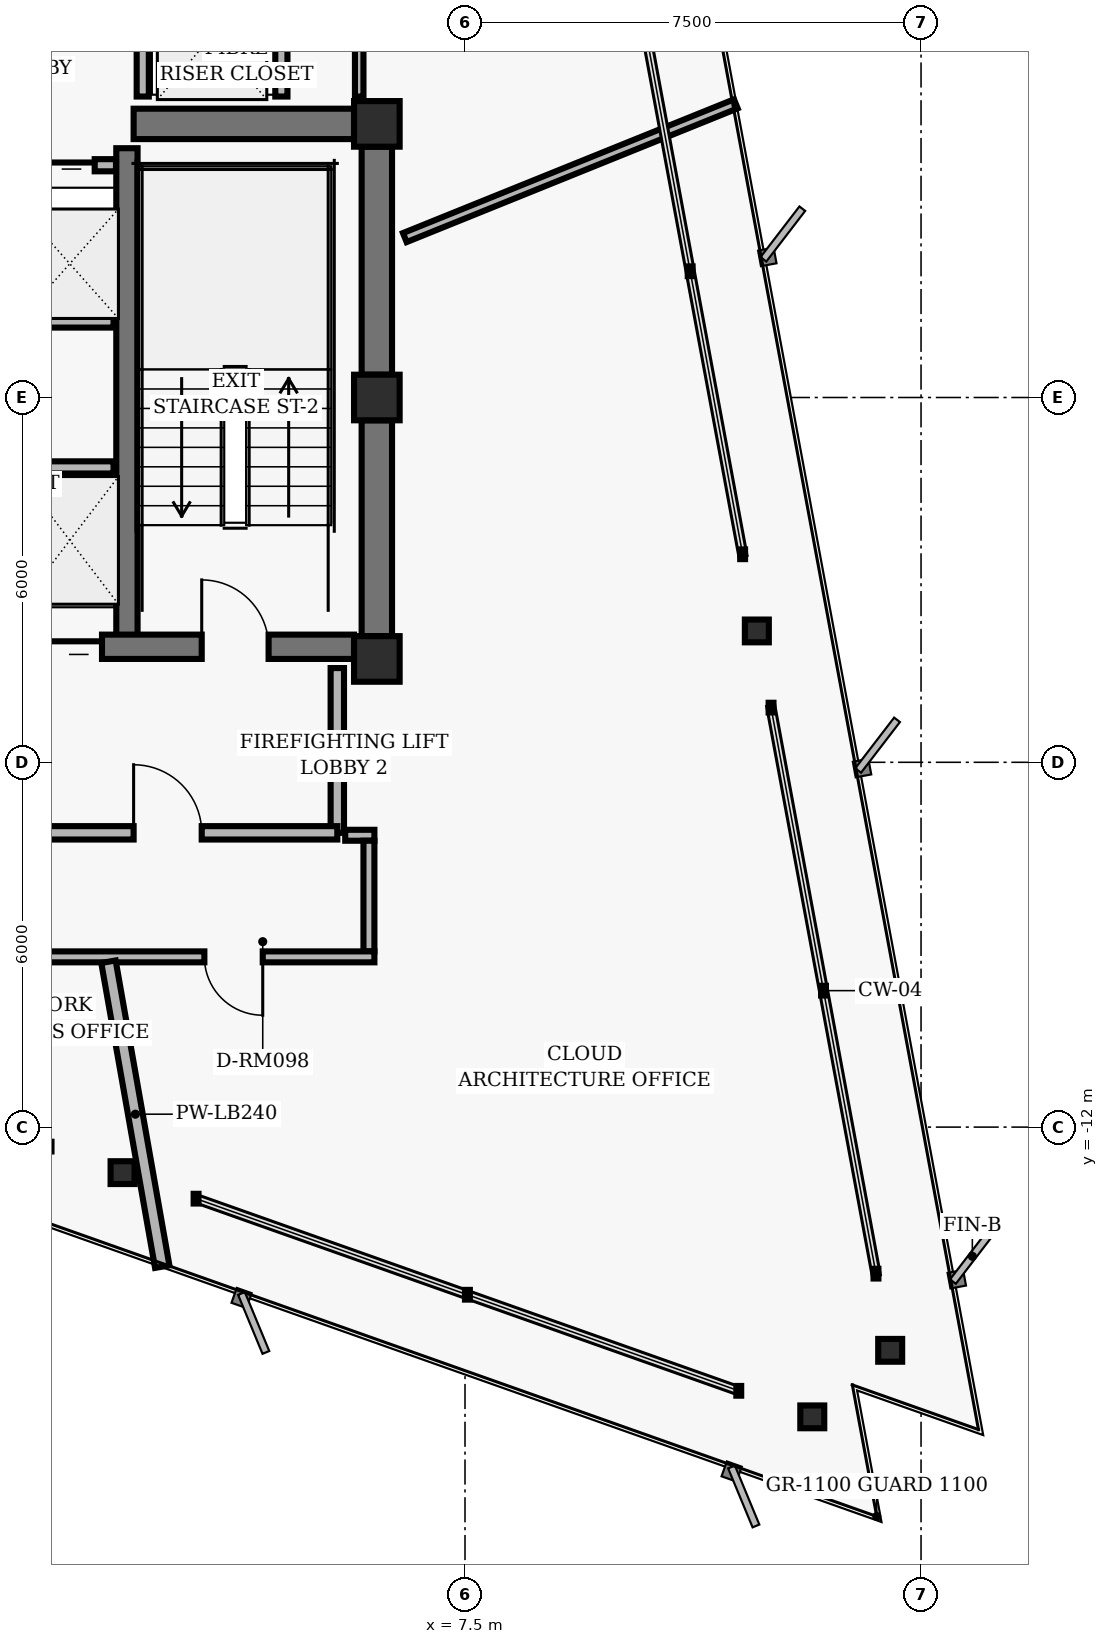
"""IFC4 building model, lengths in metres.
Left out: names, types, materials, properties, quantities, classifications, styles, units other than length and angle.
Written with IfcOpenShell. Run it as: python <this file> out.ifc"""

import sys

from ifc_helpers import new_model, si_unit, direction, frame, frame_2d, origin, origin_2d, place, context, subcontext, project, spatial, rectangle, hollow_rectangle, i_section, extrude, element, fill, save


model = new_model("IFC4")
c1 = context("Model", 3, precision=1e-05, world=origin(), true_north=direction((0.0, 1.0)))
c2 = subcontext(c1, "Body", "Model", "MODEL_VIEW")
j1 = project(units=[si_unit("LENGTHUNIT", "METRE"), si_unit("PLANEANGLEUNIT", "RADIAN")], contexts=[c1])
p1 = place(None, origin())
s1 = spatial("IfcSite", under=j1, at=p1, CompositionType="ELEMENT")
p2 = place(p1, origin())
s2 = spatial("IfcBuilding", under=s1, at=p2, CompositionType="ELEMENT")
p3 = place(p2, frame((0.0, 0.0, 190.56)))
s3 = spatial("IfcBuildingStorey", under=s2, at=p3, CompositionType="ELEMENT", Elevation=190.56)
for number, where, z_axis, x_axis in (
    (1, (6.05, 4.5, 0.0), (0.0, 0.0, 1.0), (1.0, 0.0, 0.0)),
    (2, (6.05, 0.0, 0.0), (0.0, 0.0, 1.0), (1.0, 0.0, 0.0)),
    (3, (6.05, -4.3, 0.0), (0.0, 0.0, 1.0), (1.0, 0.0, 0.0)),
):
    element("IfcColumn", number, at=place(p3, frame(where, z_axis=z_axis, x_axis=x_axis)), inside=s3, PredefinedType="COLUMN", context=c2, shape_type="SweptSolid", body=[
        extrude(hollow_rectangle(XDim=0.75, YDim=0.75, WallThickness=0.05, InnerFilletRadius=0.02, OuterFilletRadius=0.04, at=origin_2d()), origin(), (0.0, 0.0, 1.0), 3.04),
    ])
p4 = place(p3, frame((6.05, 0.375, 0.0), z_axis=(0.0, 0.0, 1.0), x_axis=(0.0, 1.0, 0.0)))
e4 = element("IfcWall", 4, at=p4, inside=s3, PredefinedType="SHEAR", context=c2, shape_type="SweptSolid", body=[
    extrude(rectangle(XDim=3.75, YDim=0.5, at=frame_2d((1.875, 0.0))), origin(), (0.0, 0.0, 1.0), 2.618),
])
p5 = place(p3, frame((6.05, -3.925, 0.0), z_axis=(0.0, 0.0, 1.0), x_axis=(0.0, 1.0, 0.0)))
e5 = element("IfcWall", 5, at=p5, inside=s3, PredefinedType="SHEAR", context=c2, shape_type="SweptSolid", body=[
    extrude(rectangle(XDim=3.55, YDim=0.5, at=frame_2d((1.775, 0.0))), origin(), (0.0, 0.0, 1.0), 2.618),
])
p6 = place(p3, frame((1.94, -4.1, 0.0), z_axis=(0.0, 0.0, 1.0), x_axis=(0.0, 1.0, 0.0)))
e6 = element("IfcWall", 6, at=p6, inside=s3, PredefinedType="SHEAR", context=c2, shape_type="SweptSolid", body=[
    extrude(rectangle(XDim=8.2, YDim=0.35, at=frame_2d((4.1, 0.0))), origin(), (0.0, 0.0, 1.0), 2.618),
])
p7 = place(p3, frame((-5.675, -4.1, 0.0), z_axis=(0.0, 0.0, 1.0), x_axis=(1.0, 0.0, 0.0)))
e7 = element("IfcWall", 7, at=p7, inside=s3, PredefinedType="SHEAR", context=c2, shape_type="SweptSolid", body=[
    extrude(rectangle(XDim=11.35, YDim=0.4, at=frame_2d((5.675, 0.0))), origin(), (0.0, 0.0, 1.0), 2.618),
])
p8 = place(p7, frame((1.405, 0.0, 0.0)))
e8 = element("IfcOpeningElement", 8, at=p8, cuts=e7, PredefinedType="OPENING", context=c2, shape_type="SweptSolid", body=[
    extrude(rectangle(XDim=1.1, YDim=2.04, at=frame_2d((0.55, 1.02))), frame((0.0, 0.21, 0.0), z_axis=(0.0, -1.0, 0.0), x_axis=(1.0, 0.0, 0.0)), (0.0, 0.0, 1.0), 0.42),
])
p9 = place(p7, frame((8.845, 0.0, 0.0)))
e9 = element("IfcOpeningElement", 9, at=p9, cuts=e7, PredefinedType="OPENING", context=c2, shape_type="SweptSolid", body=[
    extrude(rectangle(XDim=1.1, YDim=2.04, at=frame_2d((0.55, 1.02))), frame((0.0, 0.21, 0.0), z_axis=(0.0, -1.0, 0.0), x_axis=(1.0, 0.0, 0.0)), (0.0, 0.0, 1.0), 0.42),
])
p10 = place(p7, frame((4.145, 0.0, 0.0)))
e10 = element("IfcOpeningElement", 10, at=p10, cuts=e7, PredefinedType="OPENING", context=c2, shape_type="SweptSolid", body=[
    extrude(rectangle(XDim=1.06, YDim=2.04, at=frame_2d((0.53, 1.02))), frame((0.0, 0.21, 0.0), z_axis=(0.0, -1.0, 0.0), x_axis=(1.0, 0.0, 0.0)), (0.0, 0.0, 1.0), 0.42),
])
p11 = place(p7, frame((6.145, 0.0, 0.0)))
e11 = element("IfcOpeningElement", 11, at=p11, cuts=e7, PredefinedType="OPENING", context=c2, shape_type="SweptSolid", body=[
    extrude(rectangle(XDim=1.06, YDim=2.04, at=frame_2d((0.53, 1.02))), frame((0.0, 0.21, 0.0), z_axis=(0.0, -1.0, 0.0), x_axis=(1.0, 0.0, 0.0)), (0.0, 0.0, 1.0), 0.42),
])
p12 = place(p3, frame((2.05, 4.5, 0.0), z_axis=(0.0, 0.0, 1.0), x_axis=(1.0, 0.0, 0.0)))
e12 = element("IfcWall", 12, at=p12, inside=s3, PredefinedType="SHEAR", context=c2, shape_type="SweptSolid", body=[
    extrude(rectangle(XDim=3.625, YDim=0.5, at=frame_2d((1.812, 0.0))), origin(), (0.0, 0.0, 1.0), 2.618),
])
for number, where, z_axis, x_axis in (
    (13, (14.492, -15.671, 0.0), (0.0, 0.0, 1.0), (1.0, 0.0, 0.0)),
    (14, (12.3, -3.84, 0.0), (0.0, 0.0, 1.0), (1.0, 0.0, 0.0)),
    (15, (1.868, -12.749, 0.0), (0.0, 0.0, 1.0), (1.0, 0.0, 0.0)),
    (16, (13.211, -16.766, 0.0), (0.0, 0.0, 1.0), (1.0, 0.0, 0.0)),
):
    element("IfcColumn", number, at=place(p3, frame(where, z_axis=z_axis, x_axis=x_axis)), inside=s3, PredefinedType="COLUMN", context=c2, shape_type="SweptSolid", body=[
        extrude(i_section(OverallWidth=0.394, OverallDepth=0.375, WebThickness=0.017, FlangeThickness=0.028, FilletRadius=0.016, at=origin_2d()), origin(), (0.0, 0.0, 1.0), 3.04),
    ])
p13 = place(p3, frame((-1.72, -1.15, 0.0), z_axis=(0.0, 0.0, 1.0), x_axis=(1.0, 0.0, 0.0)))
e17 = element("IfcWall", 17, at=p13, inside=s3, PredefinedType="PARTITIONING", context=c2, shape_type="SweptSolid", body=[
    extrude(rectangle(XDim=3.44, YDim=0.2, at=frame_2d((1.72, 0.0))), origin(), (0.0, 0.0, 1.0), 2.593),
])
p14 = place(p3, frame((5.4, -7.16, 0.0), z_axis=(0.0, 0.0, 1.0), x_axis=(0.0, 1.0, 0.0)))
e18 = element("IfcWall", 18, at=p14, inside=s3, PredefinedType="PARTITIONING", context=c2, shape_type="SweptSolid", body=[
    extrude(rectangle(XDim=2.71, YDim=0.22, at=frame_2d((1.355, 0.0))), origin(), (0.0, 0.0, 1.0), 2.593),
])
p15 = place(p3, frame((0.0, -7.16, 0.0), z_axis=(0.0, 0.0, 1.0), x_axis=(1.0, 0.0, 0.0)))
e19 = element("IfcWall", 19, at=p15, inside=s3, PredefinedType="PARTITIONING", context=c2, shape_type="SweptSolid", body=[
    extrude(rectangle(XDim=5.4, YDim=0.22, at=frame_2d((2.7, 0.0))), origin(), (0.0, 0.0, 1.0), 2.215),
])
p16 = place(p15, frame((2.05, 0.0, 0.0)))
e20 = element("IfcOpeningElement", 20, at=p16, cuts=e19, PredefinedType="OPENING", context=c2, shape_type="SweptSolid", body=[
    extrude(rectangle(XDim=1.12, YDim=2.02, at=frame_2d((0.56, 1.01))), frame((0.0, 0.12, 0.0), z_axis=(0.0, -1.0, 0.0), x_axis=(1.0, 0.0, 0.0)), (0.0, 0.0, 1.0), 0.24),
])
p17 = place(p3, frame((-1.72, 1.25, 0.0), z_axis=(0.0, 0.0, 1.0), x_axis=(1.0, 0.0, 0.0)))
e21 = element("IfcWall", 21, at=p17, inside=s3, PredefinedType="PARTITIONING", context=c2, shape_type="SweptSolid", body=[
    extrude(rectangle(XDim=3.44, YDim=0.2, at=frame_2d((1.72, 0.0))), origin(), (0.0, 0.0, 1.0), 2.593),
])
p18 = place(p3, frame((-1.76, 3.82, 0.0), z_axis=(0.0, 0.0, 1.0), x_axis=(1.0, 0.0, 0.0)))
e22 = element("IfcWall", 22, at=p18, inside=s3, PredefinedType="PARTITIONING", context=c2, shape_type="SweptSolid", body=[
    extrude(rectangle(XDim=3.52, YDim=0.2, at=frame_2d((1.76, 0.0))), origin(), (0.0, 0.0, 1.0), 2.593),
])
p19 = place(p18, frame((0.35, 0.0, 0.0)))
e23 = element("IfcOpeningElement", 23, at=p19, cuts=e22, PredefinedType="OPENING", context=c2, shape_type="SweptSolid", body=[
    extrude(rectangle(XDim=1.06, YDim=2.04, at=frame_2d((0.53, 1.02))), frame((0.0, 0.11, 0.0), z_axis=(0.0, -1.0, 0.0), x_axis=(1.0, 0.0, 0.0)), (0.0, 0.0, 1.0), 0.22),
])
p20 = place(p18, frame((2.11, 0.0, 0.0)))
e24 = element("IfcOpeningElement", 24, at=p20, cuts=e22, PredefinedType="OPENING", context=c2, shape_type="SweptSolid", body=[
    extrude(rectangle(XDim=1.06, YDim=2.04, at=frame_2d((0.53, 1.02))), frame((0.0, 0.11, 0.0), z_axis=(0.0, -1.0, 0.0), x_axis=(1.0, 0.0, 0.0)), (0.0, 0.0, 1.0), 0.22),
])
for number, where, z_axis, x_axis in (
    (25, (2.2, 4.95, 0.0), (0.0, 0.0, 1.0), (0.0, 1.0, 0.0)),
    (26, (4.48, 4.95, 0.0), (0.0, 0.0, 1.0), (0.0, 1.0, 0.0)),
):
    element("IfcWall", number, at=place(p3, frame(where, z_axis=z_axis, x_axis=x_axis)), inside=s3, PredefinedType="PARTITIONING", context=c2, shape_type="SweptSolid", body=[
        extrude(rectangle(XDim=2.1, YDim=0.2, at=frame_2d((1.05, 0.0))), origin(), (0.0, 0.0, 1.0), 2.593),
    ])
p21 = place(p3, frame((5.76, 4.95, 0.0), z_axis=(0.0, 0.0, 1.0), x_axis=(0.0, 1.0, 0.0)))
e27 = element("IfcWall", 27, at=p21, inside=s3, PredefinedType="PARTITIONING", context=c2, shape_type="SweptSolid", body=[
    extrude(rectangle(XDim=2.1, YDim=0.14, at=frame_2d((1.05, 0.0))), origin(), (0.0, 0.0, 1.0), 2.073),
])
p22 = place(p3, frame((5.53, -7.2, 0.0), z_axis=(0.0, 0.0, 1.0), x_axis=(1.0, 0.0, 0.0)))
e28 = element("IfcWall", 28, at=p22, inside=s3, PredefinedType="PARTITIONING", context=c2, shape_type="SweptSolid", body=[
    extrude(rectangle(XDim=0.48, YDim=0.18, at=frame_2d((0.24, 0.0))), origin(), (0.0, 0.0, 1.0), 2.593),
])
p23 = place(p3, frame((5.92, -7.29, 0.0), z_axis=(0.0, 0.0, 1.0), x_axis=(0.0, -1.0, 0.0)))
e29 = element("IfcWall", 29, at=p23, inside=s3, PredefinedType="PARTITIONING", context=c2, shape_type="SweptSolid", body=[
    extrude(rectangle(XDim=1.82, YDim=0.18, at=frame_2d((0.91, 0.0))), origin(), (0.0, 0.0, 1.0), 2.593),
])
p24 = place(p3, frame((6.01, -9.2, 0.0), z_axis=(0.0, 0.0, 1.0), x_axis=(-1.0, 0.0, 0.0)))
e30 = element("IfcWall", 30, at=p24, inside=s3, PredefinedType="PARTITIONING", context=c2, shape_type="SweptSolid", body=[
    extrude(rectangle(XDim=13.3, YDim=0.18, at=frame_2d((6.65, 0.0))), origin(), (0.0, 0.0, 1.0), 2.215),
])
p25 = place(p24, frame((8.227, 0.0, 0.0)))
e31 = element("IfcOpeningElement", 31, at=p25, cuts=e30, PredefinedType="OPENING", context=c2, shape_type="SweptSolid", body=[
    extrude(rectangle(XDim=0.96, YDim=2.02, at=frame_2d((0.48, 1.01))), frame((0.0, 0.1, 0.0), z_axis=(0.0, -1.0, 0.0), x_axis=(1.0, 0.0, 0.0)), (0.0, 0.0, 1.0), 0.2),
])
p26 = place(p24, frame((1.836, 0.0, 0.0)))
e32 = element("IfcOpeningElement", 32, at=p26, cuts=e30, PredefinedType="OPENING", context=c2, shape_type="SweptSolid", body=[
    extrude(rectangle(XDim=0.96, YDim=2.02, at=frame_2d((0.48, 1.01))), frame((0.0, 0.1, 0.0), z_axis=(0.0, -1.0, 0.0), x_axis=(1.0, 0.0, 0.0)), (0.0, 0.0, 1.0), 0.2),
])
p27 = place(p3, frame((1.636, -9.28, 0.0), z_axis=(0.0, 0.0, 1.0), x_axis=(0.173634919368, -0.984810090716, 0.0)))
e33 = element("IfcWall", 33, at=p27, inside=s3, PredefinedType="PARTITIONING", context=c2, shape_type="SweptSolid", body=[
    extrude(rectangle(XDim=5.093, YDim=0.24, at=frame_2d((2.546, 0.0))), origin(), (0.0, 0.0, 1.0), 2.593),
])
p28 = place(p3, frame((6.51, 2.63, 0.0), z_axis=(0.0, 0.0, 1.0), x_axis=(0.927189354085, 0.374592981342, 0.0)))
e34 = element("IfcWall", 34, at=p28, inside=s3, PredefinedType="PARTITIONING", context=c2, shape_type="SweptSolid", body=[
    extrude(rectangle(XDim=5.872, YDim=0.16, at=frame_2d((2.936, 0.0))), origin(), (0.0, 0.0, 1.0), 2.593),
])
p29 = place(p9, origin())
e35 = element("IfcDoor", 35, at=p29, inside=s3, OperationType="SINGLE_SWING_LEFT", PredefinedType="DOOR", context=c2, shape_type="SweptSolid", body=[
    extrude(rectangle(XDim=1.1, YDim=2.04, at=frame_2d((0.55, 1.02))), frame((0.0, 0.025, 0.0), z_axis=(0.0, -1.0, 0.0), x_axis=(1.0, 0.0, 0.0)), (0.0, 0.0, 1.0), 0.05),
])
fill(e9, e35)
p30 = place(p11, origin())
e36 = element("IfcDoor", 36, at=p30, inside=s3, OperationType="SLIDING_TO_RIGHT", PredefinedType="DOOR", context=c2, shape_type="SweptSolid", body=[
    extrude(rectangle(XDim=1.06, YDim=2.04, at=frame_2d((0.53, 1.02))), frame((0.0, 0.025, 0.0), z_axis=(0.0, -1.0, 0.0), x_axis=(1.0, 0.0, 0.0)), (0.0, 0.0, 1.0), 0.05),
])
fill(e11, e36)
p31 = place(p16, origin())
e37 = element("IfcDoor", 37, at=p31, inside=s3, OperationType="SINGLE_SWING_LEFT", PredefinedType="DOOR", context=c2, shape_type="SweptSolid", body=[
    extrude(rectangle(XDim=1.12, YDim=2.02, at=frame_2d((0.56, 1.01))), frame((0.0, 0.025, 0.0), z_axis=(0.0, -1.0, 0.0), x_axis=(1.0, 0.0, 0.0)), (0.0, 0.0, 1.0), 0.05),
])
fill(e20, e37)
p32 = place(p20, origin())
e38 = element("IfcDoor", 38, at=p32, inside=s3, OperationType="SLIDING_TO_RIGHT", PredefinedType="DOOR", context=c2, shape_type="SweptSolid", body=[
    extrude(rectangle(XDim=1.06, YDim=2.04, at=frame_2d((0.53, 1.02))), frame((0.0, 0.025, 0.0), z_axis=(0.0, -1.0, 0.0), x_axis=(1.0, 0.0, 0.0)), (0.0, 0.0, 1.0), 0.05),
])
fill(e24, e38)
p33 = place(p26, origin())
e39 = element("IfcDoor", 39, at=p33, inside=s3, OperationType="SINGLE_SWING_LEFT", PredefinedType="DOOR", context=c2, shape_type="SweptSolid", body=[
    extrude(rectangle(XDim=0.96, YDim=2.02, at=frame_2d((0.48, 1.01))), frame((0.0, 0.025, 0.0), z_axis=(0.0, -1.0, 0.0), x_axis=(1.0, 0.0, 0.0)), (0.0, 0.0, 1.0), 0.05),
])
fill(e32, e39)
save(model, sys.argv[1])
